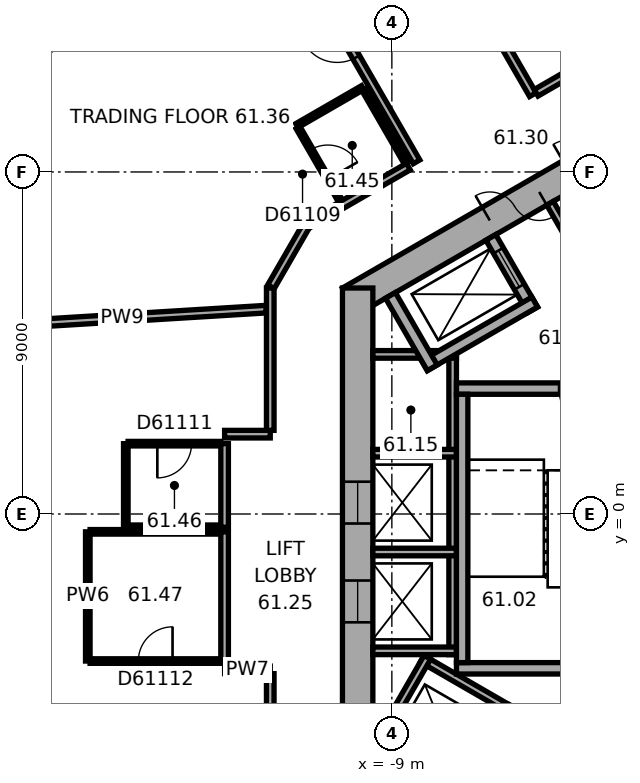
"""IFC4 building model, lengths in metres.
Left out: names, types, materials, properties, quantities, classifications, styles, units other than length and angle.
Written with IfcOpenShell. Run it as: python <this file> out.ifc"""

import sys

from ifc_helpers import new_model, si_unit, direction, frame, frame_2d, origin, origin_2d, place, context, subcontext, project, spatial, rectangle, extrude, element, fill, save


model = new_model("IFC4")
c1 = context("Model", 3, precision=1e-05, world=origin(), true_north=direction((0.0, 1.0)))
c2 = subcontext(c1, "Body", "Model", "MODEL_VIEW")
j1 = project(units=[si_unit("LENGTHUNIT", "METRE"), si_unit("PLANEANGLEUNIT", "RADIAN")], contexts=[c1])
p1 = place(None, origin())
s1 = spatial("IfcSite", under=j1, at=p1, CompositionType="ELEMENT")
p2 = place(p1, origin())
s2 = spatial("IfcBuilding", under=s1, at=p2, CompositionType="ELEMENT")
p3 = place(p2, frame((0.0, 0.0, 247.6)))
s3 = spatial("IfcBuildingStorey", under=s2, at=p3, CompositionType="ELEMENT", Elevation=247.6)
p4 = place(p3, frame((-18.345, 12.445, 0.0), z_axis=(0.0, 0.0, 1.0), x_axis=(-0.866025403784, -0.5, 0.0)))
e1 = element("IfcColumn", 1, at=p4, inside=s3, PredefinedType="COLUMN", context=c2, shape_type="SweptSolid", body=[
    extrude(rectangle(XDim=1.0, YDim=0.8, at=origin_2d()), origin(), (0.0, 0.0, 1.0), 3.7),
])
p5 = place(p3, frame((0.2, 11.547, 0.0), z_axis=(0.0, 0.0, 1.0), x_axis=(-0.866023897231, -0.500002609418, 0.0)))
e2 = element("IfcWall", 2, at=p5, inside=s3, PredefinedType="SHEAR", context=c2, shape_type="SweptSolid", body=[
    extrude(rectangle(XDim=11.894, YDim=0.8, at=frame_2d((5.947, 0.0))), origin(), (0.0, 0.0, 1.0), 3.7),
])
p6 = place(p5, frame((6.147, 0.0, 0.0)))
e3 = element("IfcOpeningElement", 3, at=p6, cuts=e2, PredefinedType="OPENING", context=c2, shape_type="SweptSolid", body=[
    extrude(rectangle(XDim=1.5, YDim=2.1, at=frame_2d((0.75, 1.05))), frame((0.0, 0.41, 0.0), z_axis=(0.0, -1.0, 0.0), x_axis=(1.0, 0.0, 0.0)), (0.0, 0.0, 1.0), 0.82),
])
p7 = place(p5, frame((1.697, 0.0, 0.0)))
e4 = element("IfcOpeningElement", 4, at=p7, cuts=e2, PredefinedType="OPENING", context=c2, shape_type="SweptSolid", body=[
    extrude(rectangle(XDim=0.9, YDim=2.1, at=frame_2d((0.45, 1.05))), frame((0.0, 0.41, 0.0), z_axis=(0.0, -1.0, 0.0), x_axis=(1.0, 0.0, 0.0)), (0.0, 0.0, 1.0), 0.82),
])
p8 = place(p5, frame((4.297, 0.0, 0.0)))
e5 = element("IfcOpeningElement", 5, at=p8, cuts=e2, PredefinedType="OPENING", context=c2, shape_type="SweptSolid", body=[
    extrude(rectangle(XDim=0.9, YDim=2.1, at=frame_2d((0.45, 1.05))), frame((0.0, 0.41, 0.0), z_axis=(0.0, -1.0, 0.0), x_axis=(1.0, 0.0, 0.0)), (0.0, 0.0, 1.0), 0.82),
])
p9 = place(p3, frame((-9.9, 5.947, 0.0), z_axis=(0.0, 0.0, 1.0), x_axis=(0.0, -1.0, 0.0)))
e6 = element("IfcWall", 6, at=p9, inside=s3, PredefinedType="SHEAR", context=c2, shape_type="SweptSolid", body=[
    extrude(rectangle(XDim=11.894, YDim=0.8, at=frame_2d((5.947, 0.0))), origin(), (0.0, 0.0, 1.0), 3.7),
])
p10 = place(p9, frame((5.097, 0.0, 0.0)))
e7 = element("IfcOpeningElement", 7, at=p10, cuts=e6, PredefinedType="OPENING", context=c2, shape_type="SweptSolid", body=[
    extrude(rectangle(XDim=1.1, YDim=2.1, at=frame_2d((0.55, 1.05))), frame((0.0, 0.41, 0.0), z_axis=(0.0, -1.0, 0.0), x_axis=(1.0, 0.0, 0.0)), (0.0, 0.0, 1.0), 0.82),
])
p11 = place(p9, frame((7.697, 0.0, 0.0)))
e8 = element("IfcOpeningElement", 8, at=p11, cuts=e6, PredefinedType="OPENING", context=c2, shape_type="SweptSolid", body=[
    extrude(rectangle(XDim=1.1, YDim=2.1, at=frame_2d((0.55, 1.05))), frame((0.0, 0.41, 0.0), z_axis=(0.0, -1.0, 0.0), x_axis=(1.0, 0.0, 0.0)), (0.0, 0.0, 1.0), 0.82),
])
p12 = place(p3, frame((-3.737, 6.272, 0.0), z_axis=(0.0, 0.0, 1.0), x_axis=(-0.50002983664, 0.866008176907, 0.0)))
e9 = element("IfcWall", 9, at=p12, inside=s3, PredefinedType="PARTITIONING", context=c2, shape_type="SweptSolid", body=[
    extrude(rectangle(XDim=2.2, YDim=0.2, at=frame_2d((1.1, 0.0))), origin(), (0.0, 0.0, 1.0), 3.42),
])
p13 = place(p3, frame((-7.4, 4.3, 0.0), z_axis=(0.0, 0.0, 1.0), x_axis=(0.0, -1.0, 0.0)))
e10 = element("IfcWall", 10, at=p13, inside=s3, PredefinedType="PARTITIONING", context=c2, shape_type="SweptSolid", body=[
    extrude(rectangle(XDim=8.0, YDim=0.2, at=frame_2d((4.0, 0.0))), origin(), (0.0, 0.0, 1.0), 3.42),
])
for number, where, z_axis, x_axis in (
    (11, (-7.3, 4.2, 0.0), (0.0, 0.0, 1.0), (-1.0, 0.0, 0.0)),
    (12, (-7.3, 1.6, 0.0), (0.0, 0.0, 1.0), (-1.0, 0.0, 0.0)),
    (13, (-7.3, -1.0, 0.0), (0.0, 0.0, 1.0), (-1.0, 0.0, 0.0)),
    (14, (-7.3, -3.6, 0.0), (0.0, 0.0, 1.0), (-1.0, 0.0, 0.0)),
):
    element("IfcWall", number, at=place(p3, frame(where, z_axis=z_axis, x_axis=x_axis)), inside=s3, PredefinedType="PARTITIONING", context=c2, shape_type="SweptSolid", body=[
        extrude(rectangle(XDim=2.2, YDim=0.2, at=frame_2d((1.1, 0.0))), origin(), (0.0, 0.0, 1.0), 3.42),
    ])
p14 = place(p3, frame((-8.203, -3.809, 0.0), z_axis=(0.0, 0.0, 1.0), x_axis=(0.866028230842, -0.499995103361, 0.0)))
e15 = element("IfcWall", 15, at=p14, inside=s3, PredefinedType="PARTITIONING", context=c2, shape_type="SweptSolid", body=[
    extrude(rectangle(XDim=5.4, YDim=0.2, at=frame_2d((2.7, 0.0))), origin(), (0.0, 0.0, 1.0), 3.42),
])
p15 = place(p3, frame((-8.067, -3.772, 0.0), z_axis=(0.0, 0.0, 1.0), x_axis=(-0.50002983664, -0.866008176907, 0.0)))
e16 = element("IfcWall", 16, at=p15, inside=s3, PredefinedType="PARTITIONING", context=c2, shape_type="SweptSolid", body=[
    extrude(rectangle(XDim=2.2, YDim=0.2, at=frame_2d((1.1, 0.0))), origin(), (0.0, 0.0, 1.0), 3.42),
])
p16 = place(p3, frame((-2.6, 3.3, 0.0), z_axis=(0.0, 0.0, 1.0), x_axis=(-1.0, 0.0, 0.0)))
e17 = element("IfcWall", 17, at=p16, inside=s3, PredefinedType="SHEAR", context=c2, shape_type="SweptSolid", body=[
    extrude(rectangle(XDim=4.7, YDim=0.3, at=frame_2d((2.35, 0.0))), origin(), (0.0, 0.0, 1.0), 3.42),
])
p17 = place(p16, frame((0.8, 0.0, 0.0)))
e18 = element("IfcOpeningElement", 18, at=p17, cuts=e17, PredefinedType="OPENING", context=c2, shape_type="SweptSolid", body=[
    extrude(rectangle(XDim=1.2, YDim=2.1, at=frame_2d((0.6, 1.05))), frame((0.0, 0.16, 0.0), z_axis=(0.0, -1.0, 0.0), x_axis=(1.0, 0.0, 0.0)), (0.0, 0.0, 1.0), 0.32),
])
p18 = place(p3, frame((-2.6, -4.06, 0.0), z_axis=(0.0, 0.0, 1.0), x_axis=(-1.0, 0.0, 0.0)))
e19 = element("IfcWall", 19, at=p18, inside=s3, PredefinedType="SHEAR", context=c2, shape_type="SweptSolid", body=[
    extrude(rectangle(XDim=4.7, YDim=0.3, at=frame_2d((2.35, 0.0))), origin(), (0.0, 0.0, 1.0), 3.42),
])
p19 = place(p3, frame((-7.15, 3.15, 0.0), z_axis=(0.0, 0.0, 1.0), x_axis=(0.0, -1.0, 0.0)))
e20 = element("IfcWall", 20, at=p19, inside=s3, PredefinedType="SHEAR", context=c2, shape_type="SweptSolid", body=[
    extrude(rectangle(XDim=7.06, YDim=0.3, at=frame_2d((3.53, 0.0))), origin(), (0.0, 0.0, 1.0), 3.42),
])
p20 = place(p3, frame((-5.295, 5.372, 0.0), z_axis=(0.0, 0.0, 1.0), x_axis=(-0.500077893725, 0.86598042715, 0.0)))
e21 = element("IfcWall", 21, at=p20, inside=s3, PredefinedType="SHEAR", context=c2, shape_type="SweptSolid", body=[
    extrude(rectangle(XDim=2.2, YDim=0.3, at=frame_2d((1.1, 0.0))), origin(), (0.0, 0.0, 1.0), 3.42),
])
p21 = place(p20, frame((0.7, 0.0, 0.0)))
e22 = element("IfcOpeningElement", 22, at=p21, cuts=e21, PredefinedType="OPENING", context=c2, shape_type="SweptSolid", body=[
    extrude(rectangle(XDim=1.1, YDim=2.1, at=frame_2d((0.55, 1.05))), frame((0.0, 0.16, 0.0), z_axis=(0.0, -1.0, 0.0), x_axis=(1.0, 0.0, 0.0)), (0.0, 0.0, 1.0), 0.32),
])
p22 = place(p3, frame((-5.24, 5.577, 0.0), z_axis=(0.0, 0.0, 1.0), x_axis=(-0.866014461049, -0.500018952895, 0.0)))
e23 = element("IfcWall", 23, at=p22, inside=s3, PredefinedType="SHEAR", context=c2, shape_type="SweptSolid", body=[
    extrude(rectangle(XDim=3.35, YDim=0.3, at=frame_2d((1.675, 0.0))), origin(), (0.0, 0.0, 1.0), 3.42),
])
p23 = place(p3, frame((-7.937, 3.847, 0.0), z_axis=(0.0, 0.0, 1.0), x_axis=(-0.50002983664, 0.866008176907, 0.0)))
e24 = element("IfcWall", 24, at=p23, inside=s3, PredefinedType="SHEAR", context=c2, shape_type="SweptSolid", body=[
    extrude(rectangle(XDim=2.2, YDim=0.3, at=frame_2d((1.1, 0.0))), origin(), (0.0, 0.0, 1.0), 3.42),
])
p24 = place(p3, frame((-19.888, 4.927, 0.0), z_axis=(0.0, 0.0, 1.0), x_axis=(0.998133794525, 0.061064950896, 0.0)))
e25 = element("IfcWall", 25, at=p24, inside=s3, PredefinedType="PARTITIONING", context=c2, shape_type="SweptSolid", body=[
    extrude(rectangle(XDim=7.592, YDim=0.2, at=frame_2d((3.796, 0.0))), origin(), (0.0, 0.0, 1.0), 3.42),
])
p25 = place(p3, frame((-17.001, -3.869, 0.0), z_axis=(0.0, 0.0, 1.0), x_axis=(0.0, 1.0, 0.0)))
e26 = element("IfcWall", 26, at=p25, inside=s3, PredefinedType="PARTITIONING", context=c2, shape_type="SweptSolid", body=[
    extrude(rectangle(XDim=3.4, YDim=0.12, at=frame_2d((1.7, 0.0))), origin(), (0.0, 0.0, 1.0), 3.42),
])
p26 = place(p3, frame((-16.941, -0.469, 0.0), z_axis=(0.0, 0.0, 1.0), x_axis=(1.0, 0.0, 0.0)))
e27 = element("IfcWall", 27, at=p26, inside=s3, PredefinedType="PARTITIONING", context=c2, shape_type="SweptSolid", body=[
    extrude(rectangle(XDim=3.44, YDim=0.12, at=frame_2d((1.72, 0.0))), origin(), (0.0, 0.0, 1.0), 3.42),
])
p27 = place(p3, frame((-16.001, -0.349, 0.0), z_axis=(0.0, 0.0, 1.0), x_axis=(0.0, 1.0, 0.0)))
e28 = element("IfcWall", 28, at=p27, inside=s3, PredefinedType="PARTITIONING", context=c2, shape_type="SweptSolid", body=[
    extrude(rectangle(XDim=2.2, YDim=0.12, at=frame_2d((1.1, 0.0))), origin(), (0.0, 0.0, 1.0), 3.42),
])
p28 = place(p3, frame((-15.941, 1.851, 0.0), z_axis=(0.0, 0.0, 1.0), x_axis=(1.0, 0.0, 0.0)))
e29 = element("IfcWall", 29, at=p28, inside=s3, PredefinedType="PARTITIONING", context=c2, shape_type="SweptSolid", body=[
    extrude(rectangle(XDim=2.44, YDim=0.12, at=frame_2d((1.22, 0.0))), origin(), (0.0, 0.0, 1.0), 3.42),
])
p29 = place(p28, frame((0.77, 0.0, 0.0)))
e30 = element("IfcOpeningElement", 30, at=p29, cuts=e29, PredefinedType="OPENING", context=c2, shape_type="SweptSolid", body=[
    extrude(rectangle(XDim=0.9, YDim=2.1, at=frame_2d((0.45, 1.05))), frame((0.0, 0.07, 0.0), z_axis=(0.0, -1.0, 0.0), x_axis=(1.0, 0.0, 0.0)), (0.0, 0.0, 1.0), 0.14),
])
p30 = place(p3, frame((-13.501, -3.869, 0.0), z_axis=(0.0, 0.0, 1.0), x_axis=(-1.0, 0.0, 0.0)))
e31 = element("IfcWall", 31, at=p30, inside=s3, PredefinedType="PARTITIONING", context=c2, shape_type="SweptSolid", body=[
    extrude(rectangle(XDim=3.44, YDim=0.12, at=frame_2d((1.72, 0.0))), origin(), (0.0, 0.0, 1.0), 3.42),
])
p31 = place(p30, frame((1.27, 0.0, 0.0)))
e32 = element("IfcOpeningElement", 32, at=p31, cuts=e31, PredefinedType="OPENING", context=c2, shape_type="SweptSolid", body=[
    extrude(rectangle(XDim=0.9, YDim=2.1, at=frame_2d((0.45, 1.05))), frame((0.0, 0.07, 0.0), z_axis=(0.0, -1.0, 0.0), x_axis=(1.0, 0.0, 0.0)), (0.0, 0.0, 1.0), 0.14),
])
p32 = place(p3, frame((-13.501, -0.349, 0.0), z_axis=(0.0, 0.0, 1.0), x_axis=(-1.0, 0.0, 0.0)))
e33 = element("IfcWall", 33, at=p32, inside=s3, PredefinedType="PARTITIONING", context=c2, shape_type="SweptSolid", body=[
    extrude(rectangle(XDim=2.44, YDim=0.12, at=frame_2d((1.22, 0.0))), origin(), (0.0, 0.0, 1.0), 3.42),
])
p33 = place(p3, frame((-13.401, -4.101, 0.0), z_axis=(0.0, 0.0, 1.0), x_axis=(1.0, 0.0, 0.0)))
e34 = element("IfcWall", 34, at=p33, inside=s3, PredefinedType="PARTITIONING", context=c2, shape_type="SweptSolid", body=[
    extrude(rectangle(XDim=1.201, YDim=0.2, at=frame_2d((0.601, 0.0))), origin(), (0.0, 0.0, 1.0), 3.42),
])
p34 = place(p3, frame((-13.401, -0.469, 0.0), z_axis=(0.0, 0.0, 1.0), x_axis=(0.0, -1.0, 0.0)))
e35 = element("IfcWall", 35, at=p34, inside=s3, PredefinedType="PARTITIONING", context=c2, shape_type="SweptSolid", body=[
    extrude(rectangle(XDim=3.4, YDim=0.2, at=frame_2d((1.7, 0.0))), origin(), (0.0, 0.0, 1.0), 3.42),
])
p35 = place(p3, frame((-13.401, 1.851, 0.0), z_axis=(0.0, 0.0, 1.0), x_axis=(0.0, -1.0, 0.0)))
e36 = element("IfcWall", 36, at=p35, inside=s3, PredefinedType="PARTITIONING", context=c2, shape_type="SweptSolid", body=[
    extrude(rectangle(XDim=2.2, YDim=0.2, at=frame_2d((1.1, 0.0))), origin(), (0.0, 0.0, 1.0), 3.42),
])
p36 = place(p3, frame((-12.2, -4.201, 0.0), z_axis=(0.0, 0.0, 1.0), x_axis=(0.0, -1.0, 0.0)))
e37 = element("IfcWall", 37, at=p36, inside=s3, PredefinedType="PARTITIONING", context=c2, shape_type="SweptSolid", body=[
    extrude(rectangle(XDim=1.706, YDim=0.2, at=frame_2d((0.853, 0.0))), origin(), (0.0, 0.0, 1.0), 3.42),
])
p37 = place(p3, frame((-12.2, 2.101, 0.0), z_axis=(0.0, 0.0, 1.0), x_axis=(-1.0, 0.0, 0.0)))
e38 = element("IfcWall", 38, at=p37, inside=s3, PredefinedType="PARTITIONING", context=c2, shape_type="SweptSolid", body=[
    extrude(rectangle(XDim=1.201, YDim=0.2, at=frame_2d((0.601, 0.0))), origin(), (0.0, 0.0, 1.0), 3.42),
])
p38 = place(p3, frame((-12.2, 5.947, 0.0), z_axis=(0.0, 0.0, 1.0), x_axis=(0.0, -1.0, 0.0)))
e39 = element("IfcWall", 39, at=p38, inside=s3, PredefinedType="PARTITIONING", context=c2, shape_type="SweptSolid", body=[
    extrude(rectangle(XDim=3.746, YDim=0.2, at=frame_2d((1.873, 0.0))), origin(), (0.0, 0.0, 1.0), 3.42),
])
p39 = place(p3, frame((-12.025, 15.632, 0.0), z_axis=(0.0, 0.0, 1.0), x_axis=(0.499983153418, -0.866035129944, 0.0)))
e40 = element("IfcWall", 40, at=p39, inside=s3, PredefinedType="PARTITIONING", context=c2, shape_type="SweptSolid", body=[
    extrude(rectangle(XDim=7.35, YDim=0.2, at=frame_2d((3.675, 0.0))), origin(), (0.0, 0.0, 1.0), 3.42),
])
p40 = place(p39, frame((3.175, 0.0, 0.0)))
e41 = element("IfcOpeningElement", 41, at=p40, cuts=e40, PredefinedType="OPENING", context=c2, shape_type="SweptSolid", body=[
    extrude(rectangle(XDim=1.0, YDim=2.1, at=frame_2d((0.5, 1.05))), frame((0.0, 0.11, 0.0), z_axis=(0.0, -1.0, 0.0), x_axis=(1.0, 0.0, 0.0)), (0.0, 0.0, 1.0), 0.22),
])
p41 = place(p3, frame((-11.499, 10.22, 0.0), z_axis=(0.0, 0.0, 1.0), x_axis=(0.866010750942, 0.50002537861, 0.0)))
e42 = element("IfcWall", 42, at=p41, inside=s3, PredefinedType="PARTITIONING", context=c2, shape_type="SweptSolid", body=[
    extrude(rectangle(XDim=2.0, YDim=0.12, at=frame_2d((1.0, 0.0))), origin(), (0.0, 0.0, 1.0), 3.42),
])
p42 = place(p3, frame((-11.25, 7.592, 0.0), z_axis=(0.0, 0.0, 1.0), x_axis=(-0.499964847546, -0.866045698112, 0.0)))
e43 = element("IfcWall", 43, at=p42, inside=s3, PredefinedType="PARTITIONING", context=c2, shape_type="SweptSolid", body=[
    extrude(rectangle(XDim=1.86, YDim=0.2, at=frame_2d((0.93, 0.0))), origin(), (0.0, 0.0, 1.0), 3.42),
])
p43 = place(p3, frame((-10.348, 8.228, 0.0), z_axis=(0.0, 0.0, 1.0), x_axis=(-0.500030632641, 0.866007717299, 0.0)))
e44 = element("IfcWall", 44, at=p43, inside=s3, PredefinedType="PARTITIONING", context=c2, shape_type="SweptSolid", body=[
    extrude(rectangle(XDim=2.24, YDim=0.12, at=frame_2d((1.12, 0.0))), origin(), (0.0, 0.0, 1.0), 3.42),
])
p44 = place(p43, frame((0.67, 0.0, 0.0)))
e45 = element("IfcOpeningElement", 45, at=p44, cuts=e44, PredefinedType="OPENING", context=c2, shape_type="SweptSolid", body=[
    extrude(rectangle(XDim=0.9, YDim=2.1, at=frame_2d((0.45, 1.05))), frame((0.0, 0.07, 0.0), z_axis=(0.0, -1.0, 0.0), x_axis=(1.0, 0.0, 0.0)), (0.0, 0.0, 1.0), 0.14),
])
p45 = place(p3, frame((-9.737, 11.168, 0.0), z_axis=(0.0, 0.0, 1.0), x_axis=(0.500030632641, -0.866007717299, 0.0)))
e46 = element("IfcWall", 46, at=p45, inside=s3, PredefinedType="PARTITIONING", context=c2, shape_type="SweptSolid", body=[
    extrude(rectangle(XDim=2.24, YDim=0.12, at=frame_2d((1.12, 0.0))), origin(), (0.0, 0.0, 1.0), 3.42),
])
p46 = place(p3, frame((-8.965, 17.399, 0.0), z_axis=(0.0, 0.0, 1.0), x_axis=(0.499993683172, -0.866029050776, 0.0)))
e47 = element("IfcWall", 47, at=p46, inside=s3, PredefinedType="PARTITIONING", context=c2, shape_type="SweptSolid", body=[
    extrude(rectangle(XDim=7.35, YDim=0.2, at=frame_2d((3.675, 0.0))), origin(), (0.0, 0.0, 1.0), 2.87),
])
p47 = place(p46, frame((3.175, 0.0, 0.0)))
e48 = element("IfcOpeningElement", 48, at=p47, cuts=e47, PredefinedType="OPENING", context=c2, shape_type="SweptSolid", body=[
    extrude(rectangle(XDim=1.0, YDim=2.1, at=frame_2d((0.5, 1.05))), frame((0.0, 0.11, 0.0), z_axis=(0.0, -1.0, 0.0), x_axis=(1.0, 0.0, 0.0)), (0.0, 0.0, 1.0), 0.22),
])
p48 = place(p3, frame((-8.566, 9.142, 0.0), z_axis=(0.0, 0.0, 1.0), x_axis=(-0.865999496279, -0.500044870432, 0.0)))
e49 = element("IfcWall", 49, at=p48, inside=s3, PredefinedType="PARTITIONING", context=c2, shape_type="SweptSolid", body=[
    extrude(rectangle(XDim=3.059, YDim=0.2, at=frame_2d((1.529, 0.0))), origin(), (0.0, 0.0, 1.0), 3.42),
])
p49 = place(p3, frame((-1.167, 13.414, 0.0), z_axis=(0.0, 0.0, 1.0), x_axis=(-0.866023347809, -0.500003561037, 0.0)))
e50 = element("IfcWall", 50, at=p49, inside=s3, PredefinedType="PARTITIONING", context=c2, shape_type="SweptSolid", body=[
    extrude(rectangle(XDim=4.661, YDim=0.2, at=frame_2d((2.331, 0.0))), origin(), (0.0, 0.0, 1.0), 3.42),
])
p50 = place(p6, origin())
e51 = element("IfcDoor", 51, at=p50, inside=s3, OperationType="DOUBLE_DOOR_SINGLE_SWING", PredefinedType="DOOR", context=c2, shape_type="SweptSolid", body=[
    extrude(rectangle(XDim=1.5, YDim=2.1, at=frame_2d((0.75, 1.05))), frame((0.0, 0.025, 0.0), z_axis=(0.0, -1.0, 0.0), x_axis=(1.0, 0.0, 0.0)), (0.0, 0.0, 1.0), 0.05),
])
fill(e3, e51)
p51 = place(p17, origin())
e52 = element("IfcDoor", 52, at=p51, inside=s3, OperationType="SINGLE_SWING_RIGHT", PredefinedType="DOOR", context=c2, shape_type="SweptSolid", body=[
    extrude(rectangle(XDim=1.2, YDim=2.1, at=frame_2d((0.6, 1.05))), frame((0.0, 0.025, 0.0), z_axis=(0.0, -1.0, 0.0), x_axis=(1.0, 0.0, 0.0)), (0.0, 0.0, 1.0), 0.05),
])
fill(e18, e52)
p52 = place(p21, origin())
e53 = element("IfcDoor", 53, at=p52, inside=s3, OperationType="DOUBLE_DOOR_SLIDING", PredefinedType="DOOR", context=c2, shape_type="SweptSolid", body=[
    extrude(rectangle(XDim=1.1, YDim=2.1, at=frame_2d((0.55, 1.05))), frame((0.0, 0.025, 0.0), z_axis=(0.0, -1.0, 0.0), x_axis=(1.0, 0.0, 0.0)), (0.0, 0.0, 1.0), 0.05),
])
fill(e22, e53)
p53 = place(p10, origin())
e54 = element("IfcDoor", 54, at=p53, inside=s3, OperationType="DOUBLE_DOOR_SLIDING", PredefinedType="DOOR", context=c2, shape_type="SweptSolid", body=[
    extrude(rectangle(XDim=1.1, YDim=2.1, at=frame_2d((0.55, 1.05))), frame((0.0, 0.025, 0.0), z_axis=(0.0, -1.0, 0.0), x_axis=(1.0, 0.0, 0.0)), (0.0, 0.0, 1.0), 0.05),
])
fill(e7, e54)
p54 = place(p11, origin())
e55 = element("IfcDoor", 55, at=p54, inside=s3, OperationType="DOUBLE_DOOR_SLIDING", PredefinedType="DOOR", context=c2, shape_type="SweptSolid", body=[
    extrude(rectangle(XDim=1.1, YDim=2.1, at=frame_2d((0.55, 1.05))), frame((0.0, 0.025, 0.0), z_axis=(0.0, -1.0, 0.0), x_axis=(1.0, 0.0, 0.0)), (0.0, 0.0, 1.0), 0.05),
])
fill(e8, e55)
p55 = place(p40, origin())
e56 = element("IfcDoor", 56, at=p55, inside=s3, OperationType="SINGLE_SWING_LEFT", PredefinedType="DOOR", context=c2, shape_type="SweptSolid", body=[
    extrude(rectangle(XDim=1.0, YDim=2.1, at=frame_2d((0.5, 1.05))), frame((0.0, 0.025, 0.0), z_axis=(0.0, -1.0, 0.0), x_axis=(1.0, 0.0, 0.0)), (0.0, 0.0, 1.0), 0.05),
])
fill(e41, e56)
p56 = place(p44, origin())
e57 = element("IfcDoor", 57, at=p56, inside=s3, OperationType="SINGLE_SWING_LEFT", PredefinedType="DOOR", context=c2, shape_type="SweptSolid", body=[
    extrude(rectangle(XDim=0.9, YDim=2.1, at=frame_2d((0.45, 1.05))), frame((0.0, 0.025, 0.0), z_axis=(0.0, -1.0, 0.0), x_axis=(1.0, 0.0, 0.0)), (0.0, 0.0, 1.0), 0.05),
])
fill(e45, e57)
p57 = place(p29, origin())
e58 = element("IfcDoor", 58, at=p57, inside=s3, OperationType="SINGLE_SWING_LEFT", PredefinedType="DOOR", context=c2, shape_type="SweptSolid", body=[
    extrude(rectangle(XDim=0.9, YDim=2.1, at=frame_2d((0.45, 1.05))), frame((0.0, 0.025, 0.0), z_axis=(0.0, -1.0, 0.0), x_axis=(1.0, 0.0, 0.0)), (0.0, 0.0, 1.0), 0.05),
])
fill(e30, e58)
p58 = place(p31, origin())
e59 = element("IfcDoor", 59, at=p58, inside=s3, OperationType="SINGLE_SWING_LEFT", PredefinedType="DOOR", context=c2, shape_type="SweptSolid", body=[
    extrude(rectangle(XDim=0.9, YDim=2.1, at=frame_2d((0.45, 1.05))), frame((0.0, 0.025, 0.0), z_axis=(0.0, -1.0, 0.0), x_axis=(1.0, 0.0, 0.0)), (0.0, 0.0, 1.0), 0.05),
])
fill(e32, e59)
save(model, sys.argv[1])
